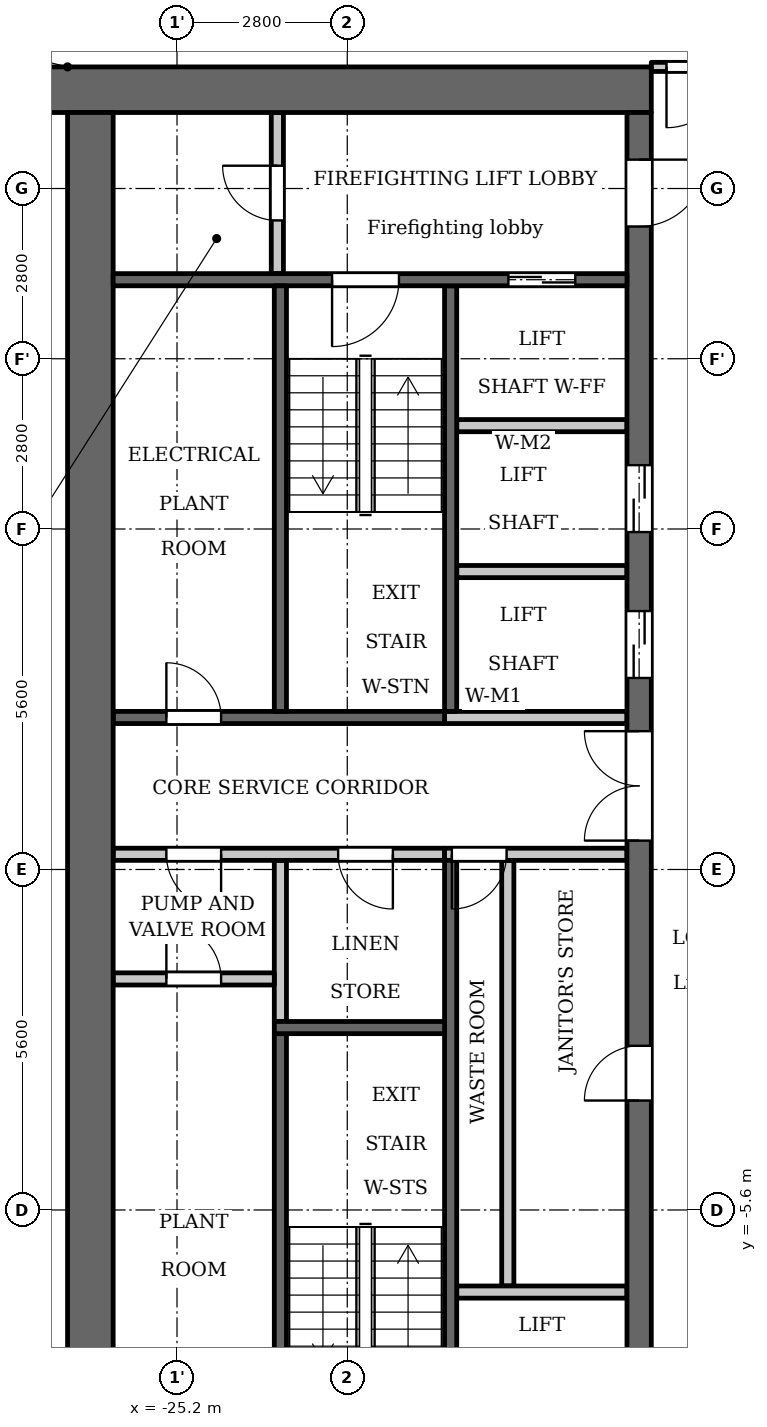
"""IFC4 building model, lengths in metres.
Left out: names, types, materials, properties, quantities, classifications, styles, units other than length and angle.
Written with IfcOpenShell. Run it as: python <this file> out.ifc"""

import sys

from ifc_helpers import new_model, si_unit, direction, frame, frame_2d, origin, place, context, subcontext, project, spatial, rectangle, extrude, element, fill, save


model = new_model("IFC4")
c1 = context("Model", 3, precision=1e-05, world=origin(), true_north=direction((0.0, 1.0)))
c2 = subcontext(c1, "Body", "Model", "MODEL_VIEW")
j1 = project(units=[si_unit("LENGTHUNIT", "METRE"), si_unit("PLANEANGLEUNIT", "RADIAN")], contexts=[c1])
p1 = place(None, origin())
s1 = spatial("IfcSite", under=j1, at=p1, CompositionType="ELEMENT")
p2 = place(p1, origin())
s2 = spatial("IfcBuilding", under=s1, at=p2, CompositionType="ELEMENT")
p3 = place(p2, frame((0.0, 0.0, 171.1)))
s3 = spatial("IfcBuildingStorey", under=s2, at=p3, CompositionType="ELEMENT", Elevation=171.1)
p4 = place(p3, frame((-23.5, -2.5, 0.0), z_axis=(0.0, 0.0, 1.0), x_axis=(0.0, 1.0, 0.0)))
e1 = element("IfcWall", 1, at=p4, inside=s3, PredefinedType="PARTITIONING", context=c2, shape_type="SweptSolid", body=[
    extrude(rectangle(XDim=2.65, YDim=0.2, at=frame_2d((1.325, 0.0))), origin(), (0.0, 0.0, 1.0), 3.2),
])
p5 = place(p3, frame((-20.7, 2.6, 0.0), z_axis=(0.0, 0.0, 1.0), x_axis=(0.0, 1.0, 0.0)))
e2 = element("IfcWall", 2, at=p5, inside=s3, PredefinedType="SHEAR", context=c2, shape_type="SweptSolid", body=[
    extrude(rectangle(XDim=7.0, YDim=0.2, at=frame_2d((3.5, 0.0))), origin(), (0.0, 0.0, 1.0), 3.2),
])
p6 = place(p3, frame((-20.7, -9.6, 0.0), z_axis=(0.0, 0.0, 1.0), x_axis=(0.0, 1.0, 0.0)))
e3 = element("IfcWall", 3, at=p6, inside=s3, PredefinedType="SHEAR", context=c2, shape_type="SweptSolid", body=[
    extrude(rectangle(XDim=9.75, YDim=0.2, at=frame_2d((4.875, 0.0))), origin(), (0.0, 0.0, 1.0), 3.2),
])
p7 = place(p3, frame((-20.8, 2.5, 0.0), z_axis=(0.0, 0.0, 1.0), x_axis=(-1.0, 0.0, 0.0)))
e4 = element("IfcWall", 4, at=p7, inside=s3, PredefinedType="SHEAR", context=c2, shape_type="SweptSolid", body=[
    extrude(rectangle(XDim=5.45, YDim=0.2, at=frame_2d((2.725, 0.0))), origin(), (0.0, 0.0, 1.0), 3.2),
])
p8 = place(p7, frame((3.675, 0.0, 0.0)))
e5 = element("IfcOpeningElement", 5, at=p8, cuts=e4, PredefinedType="OPENING", context=c2, shape_type="SweptSolid", body=[
    extrude(rectangle(XDim=0.9, YDim=2.1, at=frame_2d((0.45, 1.05))), frame((0.0, 0.11, 0.0), z_axis=(0.0, -1.0, 0.0), x_axis=(1.0, 0.0, 0.0)), (0.0, 0.0, 1.0), 0.22),
])
p9 = place(p3, frame((-20.8, 0.25, 0.0), z_axis=(0.0, 0.0, 1.0), x_axis=(-1.0, 0.0, 0.0)))
e6 = element("IfcWall", 6, at=p9, inside=s3, PredefinedType="PARTITIONING", context=c2, shape_type="SweptSolid", body=[
    extrude(rectangle(XDim=5.45, YDim=0.2, at=frame_2d((2.725, 0.0))), origin(), (0.0, 0.0, 1.0), 3.2),
])
p10 = place(p9, frame((0.85, 0.0, 0.0)))
e7 = element("IfcOpeningElement", 7, at=p10, cuts=e6, PredefinedType="OPENING", context=c2, shape_type="SweptSolid", body=[
    extrude(rectangle(XDim=0.9, YDim=2.1, at=frame_2d((0.45, 1.05))), frame((0.0, 0.11, 0.0), z_axis=(0.0, -1.0, 0.0), x_axis=(1.0, 0.0, 0.0)), (0.0, 0.0, 1.0), 0.22),
])
p11 = place(p9, frame((3.675, 0.0, 0.0)))
e8 = element("IfcOpeningElement", 8, at=p11, cuts=e6, PredefinedType="OPENING", context=c2, shape_type="SweptSolid", body=[
    extrude(rectangle(XDim=0.9, YDim=2.1, at=frame_2d((0.45, 1.05))), frame((0.0, 0.11, 0.0), z_axis=(0.0, -1.0, 0.0), x_axis=(1.0, 0.0, 0.0)), (0.0, 0.0, 1.0), 0.22),
])
p12 = place(p3, frame((-17.4, 12.825, 0.0), z_axis=(0.0, 0.0, 1.0), x_axis=(-1.0, 0.0, 0.0)))
e9 = element("IfcWall", 9, at=p12, inside=s3, PredefinedType="SHEAR", context=c2, shape_type="SweptSolid", body=[
    extrude(rectangle(XDim=10.4, YDim=0.75, at=frame_2d((5.2, 0.0))), origin(), (0.0, 0.0, 1.0), 3.2),
])
p13 = place(p3, frame((-19.76, -6.85, 0.0), z_axis=(0.0, 0.0, 1.0), x_axis=(0.0, 1.0, 0.0)))
e10 = element("IfcWall", 10, at=p13, inside=s3, PredefinedType="PARTITIONING", context=c2, shape_type="SweptSolid", body=[
    extrude(rectangle(XDim=7.0, YDim=0.2, at=frame_2d((3.5, 0.0))), origin(), (0.0, 0.0, 1.0), 3.2),
])
p14 = place(p3, frame((-17.6, -12.45, 0.0), z_axis=(0.0, 0.0, 1.0), x_axis=(0.0, 1.0, 0.0)))
e11 = element("IfcWall", 11, at=p14, inside=s3, PredefinedType="SHEAR", context=c2, shape_type="SweptSolid", body=[
    extrude(rectangle(XDim=24.9, YDim=0.4, at=frame_2d((12.45, 0.0))), origin(), (0.0, 0.0, 1.0), 3.2),
])
p15 = place(p14, frame((8.65, 0.0, 0.0)))
e12 = element("IfcOpeningElement", 12, at=p15, cuts=e11, PredefinedType="OPENING", context=c2, shape_type="SweptSolid", body=[
    extrude(rectangle(XDim=0.9, YDim=2.1, at=frame_2d((0.45, 1.05))), frame((0.0, 0.21, 0.0), z_axis=(0.0, -1.0, 0.0), x_axis=(1.0, 0.0, 0.0)), (0.0, 0.0, 1.0), 0.42),
])
p16 = place(p14, frame((15.6, 0.0, 0.0)))
e13 = element("IfcOpeningElement", 13, at=p16, cuts=e11, PredefinedType="OPENING", context=c2, shape_type="SweptSolid", body=[
    extrude(rectangle(XDim=1.1, YDim=2.1, at=frame_2d((0.55, 1.05))), frame((0.0, 0.21, 0.0), z_axis=(0.0, -1.0, 0.0), x_axis=(1.0, 0.0, 0.0)), (0.0, 0.0, 1.0), 0.42),
])
p17 = place(p14, frame((18.0, 0.0, 0.0)))
e14 = element("IfcOpeningElement", 14, at=p17, cuts=e11, PredefinedType="OPENING", context=c2, shape_type="SweptSolid", body=[
    extrude(rectangle(XDim=1.1, YDim=2.1, at=frame_2d((0.55, 1.05))), frame((0.0, 0.21, 0.0), z_axis=(0.0, -1.0, 0.0), x_axis=(1.0, 0.0, 0.0)), (0.0, 0.0, 1.0), 0.42),
])
p18 = place(p14, frame((23.025, 0.0, 0.0)))
e15 = element("IfcOpeningElement", 15, at=p18, cuts=e11, PredefinedType="OPENING", context=c2, shape_type="SweptSolid", body=[
    extrude(rectangle(XDim=1.1, YDim=2.1, at=frame_2d((0.55, 1.05))), frame((0.0, 0.21, 0.0), z_axis=(0.0, -1.0, 0.0), x_axis=(1.0, 0.0, 0.0)), (0.0, 0.0, 1.0), 0.42),
])
p19 = place(p14, frame((0.775, 0.0, 0.0)))
e16 = element("IfcOpeningElement", 16, at=p19, cuts=e11, PredefinedType="OPENING", context=c2, shape_type="SweptSolid", body=[
    extrude(rectangle(XDim=1.1, YDim=2.1, at=frame_2d((0.55, 1.05))), frame((0.0, 0.21, 0.0), z_axis=(0.0, -1.0, 0.0), x_axis=(1.0, 0.0, 0.0)), (0.0, 0.0, 1.0), 0.42),
])
p20 = place(p14, frame((12.925, 0.0, 0.0)))
e17 = element("IfcOpeningElement", 17, at=p20, cuts=e11, PredefinedType="OPENING", context=c2, shape_type="SweptSolid", body=[
    extrude(rectangle(XDim=1.8, YDim=2.1, at=frame_2d((0.9, 1.05))), frame((0.0, 0.21, 0.0), z_axis=(0.0, -1.0, 0.0), x_axis=(1.0, 0.0, 0.0)), (0.0, 0.0, 1.0), 0.42),
])
p21 = place(p3, frame((-26.625, -12.45, 0.0), z_axis=(0.0, 0.0, 1.0), x_axis=(0.0, 1.0, 0.0)))
e18 = element("IfcWall", 18, at=p21, inside=s3, PredefinedType="SHEAR", context=c2, shape_type="SweptSolid", body=[
    extrude(rectangle(XDim=24.9, YDim=0.75, at=frame_2d((12.45, 0.0))), origin(), (0.0, 0.0, 1.0), 3.2),
])
p22 = place(p3, frame((-23.55, 9.8, 0.0), z_axis=(0.0, 0.0, 1.0), x_axis=(0.0, 1.0, 0.0)))
e19 = element("IfcWall", 19, at=p22, inside=s3, PredefinedType="PARTITIONING", context=c2, shape_type="SweptSolid", body=[
    extrude(rectangle(XDim=2.65, YDim=0.2, at=frame_2d((1.325, 0.0))), origin(), (0.0, 0.0, 1.0), 3.2),
])
p23 = place(p22, frame((0.875, 0.0, 0.0)))
e20 = element("IfcOpeningElement", 20, at=p23, cuts=e19, PredefinedType="OPENING", context=c2, shape_type="SweptSolid", body=[
    extrude(rectangle(XDim=0.9, YDim=2.1, at=frame_2d((0.45, 1.05))), frame((0.0, 0.11, 0.0), z_axis=(0.0, -1.0, 0.0), x_axis=(1.0, 0.0, 0.0)), (0.0, 0.0, 1.0), 0.22),
])
p24 = place(p3, frame((-23.6, -1.8, 0.0), z_axis=(0.0, 0.0, 1.0), x_axis=(-1.0, 0.0, 0.0)))
e21 = element("IfcWall", 21, at=p24, inside=s3, PredefinedType="PARTITIONING", context=c2, shape_type="SweptSolid", body=[
    extrude(rectangle(XDim=2.65, YDim=0.2, at=frame_2d((1.325, 0.0))), origin(), (0.0, 0.0, 1.0), 3.2),
])
p25 = place(p24, frame((0.875, 0.0, 0.0)))
e22 = element("IfcOpeningElement", 22, at=p25, cuts=e21, PredefinedType="OPENING", context=c2, shape_type="SweptSolid", body=[
    extrude(rectangle(XDim=0.9, YDim=2.1, at=frame_2d((0.45, 1.05))), frame((0.0, 0.11, 0.0), z_axis=(0.0, -1.0, 0.0), x_axis=(1.0, 0.0, 0.0)), (0.0, 0.0, 1.0), 0.22),
])
p26 = place(p3, frame((-17.8, -6.95, 0.0), z_axis=(0.0, 0.0, 1.0), x_axis=(-1.0, 0.0, 0.0)))
e23 = element("IfcWall", 23, at=p26, inside=s3, PredefinedType="PARTITIONING", context=c2, shape_type="SweptSolid", body=[
    extrude(rectangle(XDim=2.8, YDim=0.2, at=frame_2d((1.4, 0.0))), origin(), (0.0, 0.0, 1.0), 3.2),
])
p27 = place(p3, frame((-17.8, 0.25, 0.0), z_axis=(0.0, 0.0, 1.0), x_axis=(-1.0, 0.0, 0.0)))
e24 = element("IfcWall", 24, at=p27, inside=s3, PredefinedType="PARTITIONING", context=c2, shape_type="SweptSolid", body=[
    extrude(rectangle(XDim=3.0, YDim=0.2, at=frame_2d((1.5, 0.0))), origin(), (0.0, 0.0, 1.0), 3.2),
])
p28 = place(p27, frame((1.98, 0.0, 0.0)))
e25 = element("IfcOpeningElement", 25, at=p28, cuts=e24, PredefinedType="OPENING", context=c2, shape_type="SweptSolid", body=[
    extrude(rectangle(XDim=0.9, YDim=2.1, at=frame_2d((0.45, 1.05))), frame((0.0, 0.11, 0.0), z_axis=(0.0, -1.0, 0.0), x_axis=(1.0, 0.0, 0.0)), (0.0, 0.0, 1.0), 0.22),
])
p29 = place(p3, frame((-17.8, 2.5, 0.0), z_axis=(0.0, 0.0, 1.0), x_axis=(-1.0, 0.0, 0.0)))
e26 = element("IfcWall", 26, at=p29, inside=s3, PredefinedType="PARTITIONING", context=c2, shape_type="SweptSolid", body=[
    extrude(rectangle(XDim=3.0, YDim=0.2, at=frame_2d((1.5, 0.0))), origin(), (0.0, 0.0, 1.0), 3.2),
])
for number, where, z_axis, x_axis in (
    (27, (-17.8, 4.9, 0.0), (0.0, 0.0, 1.0), (-1.0, 0.0, 0.0)),
    (28, (-17.8, 7.3, 0.0), (0.0, 0.0, 1.0), (-1.0, 0.0, 0.0)),
):
    element("IfcWall", number, at=place(p3, frame(where, z_axis=z_axis, x_axis=x_axis)), inside=s3, PredefinedType="PARTITIONING", context=c2, shape_type="SweptSolid", body=[
        extrude(rectangle(XDim=2.8, YDim=0.2, at=frame_2d((1.4, 0.0))), origin(), (0.0, 0.0, 1.0), 3.2),
    ])
p30 = place(p3, frame((-17.8, 9.7, 0.0), z_axis=(0.0, 0.0, 1.0), x_axis=(-1.0, 0.0, 0.0)))
e29 = element("IfcWall", 29, at=p30, inside=s3, PredefinedType="SHEAR", context=c2, shape_type="SweptSolid", body=[
    extrude(rectangle(XDim=8.45, YDim=0.2, at=frame_2d((4.225, 0.0))), origin(), (0.0, 0.0, 1.0), 3.2),
])
p31 = place(p30, frame((0.85, 0.0, 0.0)))
e30 = element("IfcOpeningElement", 30, at=p31, cuts=e29, PredefinedType="OPENING", context=c2, shape_type="SweptSolid", body=[
    extrude(rectangle(XDim=1.1, YDim=2.1, at=frame_2d((0.55, 1.05))), frame((0.0, 0.11, 0.0), z_axis=(0.0, -1.0, 0.0), x_axis=(1.0, 0.0, 0.0)), (0.0, 0.0, 1.0), 0.22),
])
p32 = place(p30, frame((3.75, 0.0, 0.0)))
e31 = element("IfcOpeningElement", 31, at=p32, cuts=e29, PredefinedType="OPENING", context=c2, shape_type="SweptSolid", body=[
    extrude(rectangle(XDim=1.1, YDim=2.1, at=frame_2d((0.55, 1.05))), frame((0.0, 0.11, 0.0), z_axis=(0.0, -1.0, 0.0), x_axis=(1.0, 0.0, 0.0)), (0.0, 0.0, 1.0), 0.22),
])
p33 = place(p3, frame((-23.5, 2.6, 0.0), z_axis=(0.0, 0.0, 1.0), x_axis=(0.0, 1.0, 0.0)))
e32 = element("IfcWall", 32, at=p33, inside=s3, PredefinedType="SHEAR", context=c2, shape_type="SweptSolid", body=[
    extrude(rectangle(XDim=7.0, YDim=0.2, at=frame_2d((3.5, 0.0))), origin(), (0.0, 0.0, 1.0), 3.2),
])
p34 = place(p3, frame((-23.5, -9.6, 0.0), z_axis=(0.0, 0.0, 1.0), x_axis=(0.0, 1.0, 0.0)))
e33 = element("IfcWall", 33, at=p34, inside=s3, PredefinedType="SHEAR", context=c2, shape_type="SweptSolid", body=[
    extrude(rectangle(XDim=6.9, YDim=0.2, at=frame_2d((3.45, 0.0))), origin(), (0.0, 0.0, 1.0), 3.2),
])
p35 = place(p3, frame((-20.8, -2.6, 0.0), z_axis=(0.0, 0.0, 1.0), x_axis=(-1.0, 0.0, 0.0)))
e34 = element("IfcWall", 34, at=p35, inside=s3, PredefinedType="SHEAR", context=c2, shape_type="SweptSolid", body=[
    extrude(rectangle(XDim=2.8, YDim=0.2, at=frame_2d((1.4, 0.0))), origin(), (0.0, 0.0, 1.0), 3.2),
])
p36 = place(p3, frame((-17.4, 13.2, 0.0), z_axis=(0.0, 0.0, 1.0), x_axis=(1.0, 0.0, 0.0)))
e35 = element("IfcWall", 35, at=p36, inside=s3, PredefinedType="PARTITIONING", context=c2, shape_type="SweptSolid", body=[
    extrude(rectangle(XDim=34.8, YDim=0.15, at=frame_2d((17.4, 0.0))), origin(), (0.0, 0.0, 1.0), 3.2),
])
p37 = place(p36, frame((0.25, 0.0, 0.0)))
e36 = element("IfcOpeningElement", 36, at=p37, cuts=e35, PredefinedType="OPENING", context=c2, shape_type="SweptSolid", body=[
    extrude(rectangle(XDim=1.0, YDim=2.1, at=frame_2d((0.5, 1.05))), frame((0.0, 0.085, 0.0), z_axis=(0.0, -1.0, 0.0), x_axis=(1.0, 0.0, 0.0)), (0.0, 0.0, 1.0), 0.17),
])
p38 = place(p36, frame((33.65, 0.0, 0.0)))
e37 = element("IfcOpeningElement", 37, at=p38, cuts=e35, PredefinedType="OPENING", context=c2, shape_type="SweptSolid", body=[
    extrude(rectangle(XDim=1.0, YDim=2.1, at=frame_2d((0.5, 1.05))), frame((0.0, 0.085, 0.0), z_axis=(0.0, -1.0, 0.0), x_axis=(1.0, 0.0, 0.0)), (0.0, 0.0, 1.0), 0.17),
])
p39 = place(p36, frame((10.15, 0.0, 0.0)))
e38 = element("IfcOpeningElement", 38, at=p39, cuts=e35, PredefinedType="OPENING", context=c2, shape_type="SweptSolid", body=[
    extrude(rectangle(XDim=1.0, YDim=2.1, at=frame_2d((0.5, 1.05))), frame((0.0, 0.085, 0.0), z_axis=(0.0, -1.0, 0.0), x_axis=(1.0, 0.0, 0.0)), (0.0, 0.0, 1.0), 0.17),
])
p40 = place(p36, frame((15.75, 0.0, 0.0)))
e39 = element("IfcOpeningElement", 39, at=p40, cuts=e35, PredefinedType="OPENING", context=c2, shape_type="SweptSolid", body=[
    extrude(rectangle(XDim=1.0, YDim=2.1, at=frame_2d((0.5, 1.05))), frame((0.0, 0.085, 0.0), z_axis=(0.0, -1.0, 0.0), x_axis=(1.0, 0.0, 0.0)), (0.0, 0.0, 1.0), 0.17),
])
p41 = place(p36, frame((24.95, 0.0, 0.0)))
e40 = element("IfcOpeningElement", 40, at=p41, cuts=e35, PredefinedType="OPENING", context=c2, shape_type="SweptSolid", body=[
    extrude(rectangle(XDim=1.0, YDim=2.1, at=frame_2d((0.5, 1.05))), frame((0.0, 0.085, 0.0), z_axis=(0.0, -1.0, 0.0), x_axis=(1.0, 0.0, 0.0)), (0.0, 0.0, 1.0), 0.17),
])
p42 = place(p36, frame((29.95, 0.0, 0.0)))
e41 = element("IfcOpeningElement", 41, at=p42, cuts=e35, PredefinedType="OPENING", context=c2, shape_type="SweptSolid", body=[
    extrude(rectangle(XDim=1.0, YDim=2.1, at=frame_2d((0.5, 1.05))), frame((0.0, 0.085, 0.0), z_axis=(0.0, -1.0, 0.0), x_axis=(1.0, 0.0, 0.0)), (0.0, 0.0, 1.0), 0.17),
])
p43 = place(p15, origin())
e42 = element("IfcDoor", 42, at=p43, inside=s3, OperationType="SINGLE_SWING_RIGHT", PredefinedType="DOOR", context=c2, shape_type="SweptSolid", body=[
    extrude(rectangle(XDim=0.9, YDim=2.1, at=frame_2d((0.45, 1.05))), frame((0.0, 0.025, 0.0), z_axis=(0.0, -1.0, 0.0), x_axis=(1.0, 0.0, 0.0)), (0.0, 0.0, 1.0), 0.05),
])
fill(e12, e42)
p44 = place(p28, origin())
e43 = element("IfcDoor", 43, at=p44, inside=s3, OperationType="SINGLE_SWING_LEFT", PredefinedType="DOOR", context=c2, shape_type="SweptSolid", body=[
    extrude(rectangle(XDim=0.9, YDim=2.1, at=frame_2d((0.45, 1.05))), frame((0.0, 0.025, 0.0), z_axis=(0.0, -1.0, 0.0), x_axis=(1.0, 0.0, 0.0)), (0.0, 0.0, 1.0), 0.05),
])
fill(e25, e43)
p45 = place(p16, origin())
e44 = element("IfcDoor", 44, at=p45, inside=s3, OperationType="DOUBLE_DOOR_SLIDING", PredefinedType="DOOR", context=c2, shape_type="SweptSolid", body=[
    extrude(rectangle(XDim=1.1, YDim=2.1, at=frame_2d((0.55, 1.05))), frame((0.0, 0.025, 0.0), z_axis=(0.0, -1.0, 0.0), x_axis=(1.0, 0.0, 0.0)), (0.0, 0.0, 1.0), 0.05),
])
fill(e13, e44)
p46 = place(p17, origin())
e45 = element("IfcDoor", 45, at=p46, inside=s3, OperationType="DOUBLE_DOOR_SLIDING", PredefinedType="DOOR", context=c2, shape_type="SweptSolid", body=[
    extrude(rectangle(XDim=1.1, YDim=2.1, at=frame_2d((0.55, 1.05))), frame((0.0, 0.025, 0.0), z_axis=(0.0, -1.0, 0.0), x_axis=(1.0, 0.0, 0.0)), (0.0, 0.0, 1.0), 0.05),
])
fill(e14, e45)
p47 = place(p31, origin())
e46 = element("IfcDoor", 46, at=p47, inside=s3, OperationType="DOUBLE_DOOR_SLIDING", PredefinedType="DOOR", context=c2, shape_type="SweptSolid", body=[
    extrude(rectangle(XDim=1.1, YDim=2.1, at=frame_2d((0.55, 1.05))), frame((0.0, 0.025, 0.0), z_axis=(0.0, -1.0, 0.0), x_axis=(1.0, 0.0, 0.0)), (0.0, 0.0, 1.0), 0.05),
])
fill(e30, e46)
p48 = place(p18, origin())
e47 = element("IfcDoor", 47, at=p48, inside=s3, OperationType="SINGLE_SWING_RIGHT", PredefinedType="DOOR", context=c2, shape_type="SweptSolid", body=[
    extrude(rectangle(XDim=1.1, YDim=2.1, at=frame_2d((0.55, 1.05))), frame((0.0, 0.025, 0.0), z_axis=(0.0, -1.0, 0.0), x_axis=(1.0, 0.0, 0.0)), (0.0, 0.0, 1.0), 0.05),
])
fill(e15, e47)
p49 = place(p23, origin())
e48 = element("IfcDoor", 48, at=p49, inside=s3, OperationType="SINGLE_SWING_LEFT", PredefinedType="DOOR", context=c2, shape_type="SweptSolid", body=[
    extrude(rectangle(XDim=0.9, YDim=2.1, at=frame_2d((0.45, 1.05))), frame((0.0, 0.025, 0.0), z_axis=(0.0, -1.0, 0.0), x_axis=(1.0, 0.0, 0.0)), (0.0, 0.0, 1.0), 0.05),
])
fill(e20, e48)
p50 = place(p32, origin())
e49 = element("IfcDoor", 49, at=p50, inside=s3, OperationType="SINGLE_SWING_LEFT", PredefinedType="DOOR", context=c2, shape_type="SweptSolid", body=[
    extrude(rectangle(XDim=1.1, YDim=2.1, at=frame_2d((0.55, 1.05))), frame((0.0, 0.025, 0.0), z_axis=(0.0, -1.0, 0.0), x_axis=(1.0, 0.0, 0.0)), (0.0, 0.0, 1.0), 0.05),
])
fill(e31, e49)
p51 = place(p20, origin())
e50 = element("IfcDoor", 50, at=p51, inside=s3, OperationType="DOUBLE_DOOR_SINGLE_SWING", PredefinedType="DOOR", context=c2, shape_type="SweptSolid", body=[
    extrude(rectangle(XDim=1.8, YDim=2.1, at=frame_2d((0.9, 1.05))), frame((0.0, 0.025, 0.0), z_axis=(0.0, -1.0, 0.0), x_axis=(1.0, 0.0, 0.0)), (0.0, 0.0, 1.0), 0.05),
])
fill(e17, e50)
p52 = place(p10, origin())
e51 = element("IfcDoor", 51, at=p52, inside=s3, OperationType="SINGLE_SWING_RIGHT", PredefinedType="DOOR", context=c2, shape_type="SweptSolid", body=[
    extrude(rectangle(XDim=0.9, YDim=2.1, at=frame_2d((0.45, 1.05))), frame((0.0, 0.025, 0.0), z_axis=(0.0, -1.0, 0.0), x_axis=(1.0, 0.0, 0.0)), (0.0, 0.0, 1.0), 0.05),
])
fill(e7, e51)
p53 = place(p25, origin())
e52 = element("IfcDoor", 52, at=p53, inside=s3, OperationType="SINGLE_SWING_RIGHT", PredefinedType="DOOR", context=c2, shape_type="SweptSolid", body=[
    extrude(rectangle(XDim=0.9, YDim=2.1, at=frame_2d((0.45, 1.05))), frame((0.0, 0.025, 0.0), z_axis=(0.0, -1.0, 0.0), x_axis=(1.0, 0.0, 0.0)), (0.0, 0.0, 1.0), 0.05),
])
fill(e22, e52)
p54 = place(p11, origin())
e53 = element("IfcDoor", 53, at=p54, inside=s3, OperationType="SINGLE_SWING_RIGHT", PredefinedType="DOOR", context=c2, shape_type="SweptSolid", body=[
    extrude(rectangle(XDim=0.9, YDim=2.1, at=frame_2d((0.45, 1.05))), frame((0.0, 0.025, 0.0), z_axis=(0.0, -1.0, 0.0), x_axis=(1.0, 0.0, 0.0)), (0.0, 0.0, 1.0), 0.05),
])
fill(e8, e53)
p55 = place(p8, origin())
e54 = element("IfcDoor", 54, at=p55, inside=s3, OperationType="SINGLE_SWING_RIGHT", PredefinedType="DOOR", context=c2, shape_type="SweptSolid", body=[
    extrude(rectangle(XDim=0.9, YDim=2.1, at=frame_2d((0.45, 1.05))), frame((0.0, 0.025, 0.0), z_axis=(0.0, -1.0, 0.0), x_axis=(1.0, 0.0, 0.0)), (0.0, 0.0, 1.0), 0.05),
])
fill(e5, e54)
p56 = place(p37, origin())
e55 = element("IfcDoor", 55, at=p56, inside=s3, OperationType="SINGLE_SWING_LEFT", PredefinedType="DOOR", context=c2, shape_type="SweptSolid", body=[
    extrude(rectangle(XDim=1.0, YDim=2.1, at=frame_2d((0.5, 1.05))), frame((0.0, 0.025, 0.0), z_axis=(0.0, -1.0, 0.0), x_axis=(1.0, 0.0, 0.0)), (0.0, 0.0, 1.0), 0.05),
])
fill(e36, e55)
save(model, sys.argv[1])
